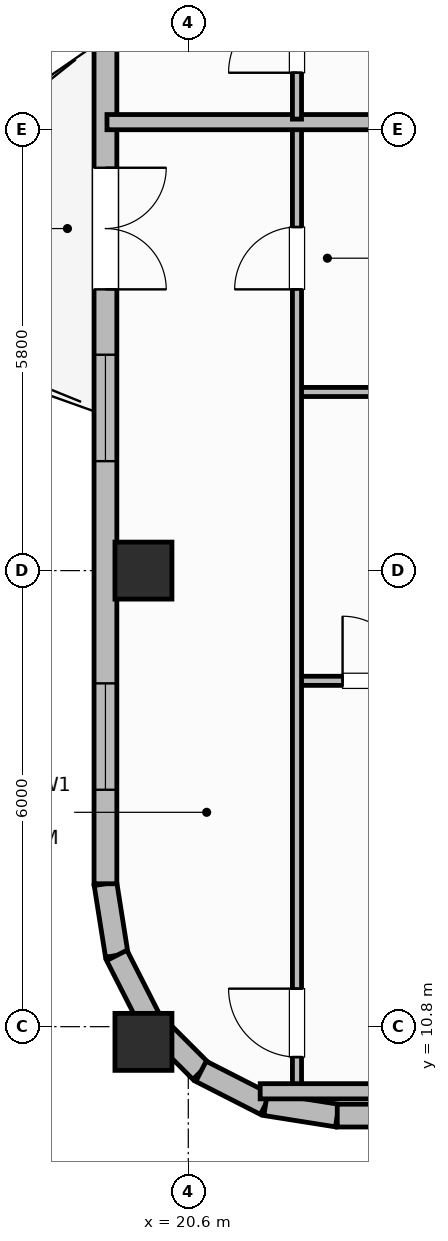
"""IFC4 building model, lengths in metres.
Left out: names, types, materials, properties, quantities, classifications, styles, units other than length and angle.
Written with IfcOpenShell. Run it as: python <this file> out.ifc"""

import sys

from ifc_helpers import new_model, si_unit, direction, frame, frame_2d, origin, origin_2d, place, context, subcontext, project, spatial, rectangle, extrude, element, fill, save


model = new_model("IFC4")
c1 = context("Model", 3, precision=1e-05, world=origin(), true_north=direction((0.0, 1.0)))
c2 = subcontext(c1, "Body", "Model", "MODEL_VIEW")
j1 = project(units=[si_unit("LENGTHUNIT", "METRE"), si_unit("PLANEANGLEUNIT", "RADIAN")], contexts=[c1])
p1 = place(None, origin())
s1 = spatial("IfcSite", under=j1, at=p1, CompositionType="ELEMENT")
p2 = place(p1, origin())
s2 = spatial("IfcBuilding", under=s1, at=p2, CompositionType="ELEMENT")
p3 = place(p2, frame((0.0, 0.0, 286.1)))
s3 = spatial("IfcBuildingStorey", under=s2, at=p3, CompositionType="ELEMENT", Elevation=286.1)
for number, where, z_axis, x_axis in (
    (1, (20.01, 10.6, 0.0), (0.0, 0.0, 1.0), (1.0, 0.0, 0.0)),
    (2, (20.01, 16.8, 0.0), (0.0, 0.0, 1.0), (1.0, 0.0, 0.0)),
):
    element("IfcColumn", number, at=place(p3, frame(where, z_axis=z_axis, x_axis=x_axis)), inside=s3, PredefinedType="COLUMN", context=c2, shape_type="SweptSolid", body=[
        extrude(rectangle(XDim=0.75, YDim=0.75, at=origin_2d()), origin(), (0.0, 0.0, 1.0), 3.7),
    ])
p4 = place(p3, frame((19.51, 12.68, 0.0), z_axis=(0.0, 0.0, 1.0), x_axis=(0.156343617883, -0.987702725088, 0.0)))
e3 = element("IfcWall", 3, at=p4, inside=s3, PredefinedType="SOLIDWALL", context=c2, shape_type="SweptSolid", body=[
    extrude(rectangle(XDim=0.954, YDim=0.3, at=frame_2d((0.477, 0.0))), origin(), (0.0, 0.0, 1.0), 2.73),
])
for number, where, z_axis, x_axis in (
    (4, (19.659, 11.738, 0.0), (0.0, 0.0, 1.0), (0.454, -0.891, 0.0)),
    (5, (20.093, 10.887, 0.0), (0.0, 0.0, 1.0), (0.707, -0.707, 0.0)),
):
    element("IfcWall", number, at=place(p3, frame(where, z_axis=z_axis, x_axis=x_axis)), inside=s3, PredefinedType="SOLIDWALL", context=c2, shape_type="SweptSolid", body=[
        extrude(rectangle(XDim=0.954, YDim=0.3, at=frame_2d((0.477, 0.0))), origin(), (0.0, 0.0, 1.0), 2.73),
    ])
p5 = place(p3, frame((20.767, 10.212, 0.0), z_axis=(0.0, 0.0, 1.0), x_axis=(0.891023873617, -0.45395644796, 0.0)))
e6 = element("IfcWall", 6, at=p5, inside=s3, PredefinedType="SOLIDWALL", context=c2, shape_type="SweptSolid", body=[
    extrude(rectangle(XDim=0.954, YDim=0.3, at=frame_2d((0.477, 0.0))), origin(), (0.0, 0.0, 1.0), 2.73),
])
p6 = place(p3, frame((21.617, 9.779, 0.0), z_axis=(0.0, 0.0, 1.0), x_axis=(0.987669453596, -0.156553666304, 0.0)))
e7 = element("IfcWall", 7, at=p6, inside=s3, PredefinedType="SOLIDWALL", context=c2, shape_type="SweptSolid", body=[
    extrude(rectangle(XDim=0.954, YDim=0.3, at=frame_2d((0.477, 0.0))), origin(), (0.0, 0.0, 1.0), 2.73),
])
p7 = place(p3, frame((22.56, 9.63, 0.0), z_axis=(0.0, 0.0, 1.0), x_axis=(1.0, 0.0, 0.0)))
e8 = element("IfcWall", 8, at=p7, inside=s3, PredefinedType="SOLIDWALL", context=c2, shape_type="SweptSolid", body=[
    extrude(rectangle(XDim=33.28, YDim=0.3, at=frame_2d((16.64, 0.0))), origin(), (0.0, 0.0, 1.0), 2.73),
])
p8 = place(p7, frame((4.747, 0.0, 0.76)))
e9 = element("IfcOpeningElement", 9, at=p8, cuts=e8, PredefinedType="OPENING", context=c2, shape_type="SweptSolid", body=[
    extrude(rectangle(XDim=1.4, YDim=1.85, at=frame_2d((0.7, 0.925))), frame((0.0, 0.16, 0.0), z_axis=(0.0, -1.0, 0.0), x_axis=(1.0, 0.0, 0.0)), (0.0, 0.0, 1.0), 0.32),
])
p9 = place(p7, frame((7.945, 0.0, 0.76)))
e10 = element("IfcOpeningElement", 10, at=p9, cuts=e8, PredefinedType="OPENING", context=c2, shape_type="SweptSolid", body=[
    extrude(rectangle(XDim=1.4, YDim=1.85, at=frame_2d((0.7, 0.925))), frame((0.0, 0.16, 0.0), z_axis=(0.0, -1.0, 0.0), x_axis=(1.0, 0.0, 0.0)), (0.0, 0.0, 1.0), 0.32),
])
p10 = place(p7, frame((14.341, 0.0, 0.76)))
e11 = element("IfcOpeningElement", 11, at=p10, cuts=e8, PredefinedType="OPENING", context=c2, shape_type="SweptSolid", body=[
    extrude(rectangle(XDim=1.4, YDim=1.85, at=frame_2d((0.7, 0.925))), frame((0.0, 0.16, 0.0), z_axis=(0.0, -1.0, 0.0), x_axis=(1.0, 0.0, 0.0)), (0.0, 0.0, 1.0), 0.32),
])
p11 = place(p7, frame((17.539, 0.0, 0.76)))
e12 = element("IfcOpeningElement", 12, at=p11, cuts=e8, PredefinedType="OPENING", context=c2, shape_type="SweptSolid", body=[
    extrude(rectangle(XDim=1.4, YDim=1.85, at=frame_2d((0.7, 0.925))), frame((0.0, 0.16, 0.0), z_axis=(0.0, -1.0, 0.0), x_axis=(1.0, 0.0, 0.0)), (0.0, 0.0, 1.0), 0.32),
])
p12 = place(p7, frame((23.935, 0.0, 0.76)))
e13 = element("IfcOpeningElement", 13, at=p12, cuts=e8, PredefinedType="OPENING", context=c2, shape_type="SweptSolid", body=[
    extrude(rectangle(XDim=1.4, YDim=1.85, at=frame_2d((0.7, 0.925))), frame((0.0, 0.16, 0.0), z_axis=(0.0, -1.0, 0.0), x_axis=(1.0, 0.0, 0.0)), (0.0, 0.0, 1.0), 0.32),
])
p13 = place(p7, frame((27.133, 0.0, 0.76)))
e14 = element("IfcOpeningElement", 14, at=p13, cuts=e8, PredefinedType="OPENING", context=c2, shape_type="SweptSolid", body=[
    extrude(rectangle(XDim=1.4, YDim=1.85, at=frame_2d((0.7, 0.925))), frame((0.0, 0.16, 0.0), z_axis=(0.0, -1.0, 0.0), x_axis=(1.0, 0.0, 0.0)), (0.0, 0.0, 1.0), 0.32),
])
p14 = place(p3, frame((19.51, 23.8, 0.0), z_axis=(0.0, 0.0, 1.0), x_axis=(0.0, -1.0, 0.0)))
e15 = element("IfcWall", 15, at=p14, inside=s3, PredefinedType="SOLIDWALL", context=c2, shape_type="SweptSolid", body=[
    extrude(rectangle(XDim=11.12, YDim=0.3, at=frame_2d((5.56, 0.0))), origin(), (0.0, 0.0, 1.0), 2.73),
])
p15 = place(p14, frame((1.7, 0.0, 0.0)))
e16 = element("IfcOpeningElement", 16, at=p15, cuts=e15, PredefinedType="OPENING", context=c2, shape_type="SweptSolid", body=[
    extrude(rectangle(XDim=1.6, YDim=2.1, at=frame_2d((0.8, 1.05))), frame((0.0, 0.16, 0.0), z_axis=(0.0, -1.0, 0.0), x_axis=(1.0, 0.0, 0.0)), (0.0, 0.0, 1.0), 0.32),
])
p16 = place(p14, frame((4.16, 0.0, 0.76)))
e17 = element("IfcOpeningElement", 17, at=p16, cuts=e15, PredefinedType="OPENING", context=c2, shape_type="SweptSolid", body=[
    extrude(rectangle(XDim=1.4, YDim=1.85, at=frame_2d((0.7, 0.925))), frame((0.0, 0.16, 0.0), z_axis=(0.0, -1.0, 0.0), x_axis=(1.0, 0.0, 0.0)), (0.0, 0.0, 1.0), 0.32),
])
p17 = place(p14, frame((8.483, 0.0, 0.76)))
e18 = element("IfcOpeningElement", 18, at=p17, cuts=e15, PredefinedType="OPENING", context=c2, shape_type="SweptSolid", body=[
    extrude(rectangle(XDim=1.4, YDim=1.85, at=frame_2d((0.7, 0.925))), frame((0.0, 0.16, 0.0), z_axis=(0.0, -1.0, 0.0), x_axis=(1.0, 0.0, 0.0)), (0.0, 0.0, 1.0), 0.32),
])
p18 = place(p3, frame((22.03, 15.35, 0.0), z_axis=(0.0, 0.0, 1.0), x_axis=(1.0, 0.0, 0.0)))
e19 = element("IfcWall", 19, at=p18, inside=s3, PredefinedType="PARTITIONING", context=c2, shape_type="SweptSolid", body=[
    extrude(rectangle(XDim=1.95, YDim=0.12, at=frame_2d((0.975, 0.0))), origin(), (0.0, 0.0, 1.0), 2.56),
])
p19 = place(p18, frame((0.6, 0.0, 0.0)))
e20 = element("IfcOpeningElement", 20, at=p19, cuts=e19, PredefinedType="OPENING", context=c2, shape_type="SweptSolid", body=[
    extrude(rectangle(XDim=0.85, YDim=2.1, at=frame_2d((0.425, 1.05))), frame((0.0, 0.07, 0.0), z_axis=(0.0, -1.0, 0.0), x_axis=(1.0, 0.0, 0.0)), (0.0, 0.0, 1.0), 0.14),
])
p20 = place(p3, frame((22.03, 19.15, 0.0), z_axis=(0.0, 0.0, 1.0), x_axis=(1.0, 0.0, 0.0)))
e21 = element("IfcWall", 21, at=p20, inside=s3, PredefinedType="PARTITIONING", context=c2, shape_type="SweptSolid", body=[
    extrude(rectangle(XDim=1.95, YDim=0.12, at=frame_2d((0.975, 0.0))), origin(), (0.0, 0.0, 1.0), 2.56),
])
p21 = place(p3, frame((22.03, 9.99, 0.0), z_axis=(0.0, 0.0, 1.0), x_axis=(0.0, 1.0, 0.0)))
e22 = element("IfcWall", 22, at=p21, inside=s3, PredefinedType="PARTITIONING", context=c2, shape_type="SweptSolid", body=[
    extrude(rectangle(XDim=12.67, YDim=0.12, at=frame_2d((6.335, 0.0))), origin(), (0.0, 0.0, 1.0), 2.56),
])
p22 = place(p21, frame((0.41, 0.0, 0.0)))
e23 = element("IfcOpeningElement", 23, at=p22, cuts=e22, PredefinedType="OPENING", context=c2, shape_type="SweptSolid", body=[
    extrude(rectangle(XDim=0.9, YDim=2.1, at=frame_2d((0.45, 1.05))), frame((0.0, 0.07, 0.0), z_axis=(0.0, -1.0, 0.0), x_axis=(1.0, 0.0, 0.0)), (0.0, 0.0, 1.0), 0.14),
])
p23 = place(p21, frame((10.51, 0.0, 0.0)))
e24 = element("IfcOpeningElement", 24, at=p23, cuts=e22, PredefinedType="OPENING", context=c2, shape_type="SweptSolid", body=[
    extrude(rectangle(XDim=0.82, YDim=2.08, at=frame_2d((0.41, 1.04))), frame((0.0, 0.07, 0.0), z_axis=(0.0, -1.0, 0.0), x_axis=(1.0, 0.0, 0.0)), (0.0, 0.0, 1.0), 0.14),
])
p24 = place(p3, frame((19.53, 22.7, 0.0), z_axis=(0.0, 0.0, 1.0), x_axis=(1.0, 0.0, 0.0)))
e25 = element("IfcWall", 25, at=p24, inside=s3, PredefinedType="PARTITIONING", context=c2, shape_type="SweptSolid", body=[
    extrude(rectangle(XDim=4.45, YDim=0.2, at=frame_2d((2.225, 0.0))), origin(), (0.0, 0.0, 1.0), 2.56),
])
p25 = place(p3, frame((22.03, 22.74, 0.0), z_axis=(0.0, 0.0, 1.0), x_axis=(0.0, 1.0, 0.0)))
e26 = element("IfcWall", 26, at=p25, inside=s3, PredefinedType="PARTITIONING", context=c2, shape_type="SweptSolid", body=[
    extrude(rectangle(XDim=11.625, YDim=0.12, at=frame_2d((5.812, 0.0))), origin(), (0.0, 0.0, 1.0), 2.56),
])
p26 = place(p25, frame((0.61, 0.0, 0.0)))
e27 = element("IfcOpeningElement", 27, at=p26, cuts=e26, PredefinedType="OPENING", context=c2, shape_type="SweptSolid", body=[
    extrude(rectangle(XDim=0.9, YDim=2.1, at=frame_2d((0.45, 1.05))), frame((0.0, 0.07, 0.0), z_axis=(0.0, -1.0, 0.0), x_axis=(1.0, 0.0, 0.0)), (0.0, 0.0, 1.0), 0.14),
])
p27 = place(p3, frame((21.546, 9.95, 0.0), z_axis=(0.0, 0.0, 1.0), x_axis=(1.0, 0.0, 0.0)))
e28 = element("IfcWall", 28, at=p27, inside=s3, PredefinedType="PARTITIONING", context=c2, shape_type="SweptSolid", body=[
    extrude(rectangle(XDim=3.754, YDim=0.2, at=frame_2d((1.877, 0.0))), origin(), (0.0, 0.0, 1.0), 2.56),
])
p28 = place(p15, origin())
e29 = element("IfcDoor", 29, at=p28, inside=s3, OperationType="DOUBLE_DOOR_SINGLE_SWING", PredefinedType="DOOR", context=c2, shape_type="SweptSolid", body=[
    extrude(rectangle(XDim=1.6, YDim=2.1, at=frame_2d((0.8, 1.05))), frame((0.0, 0.025, 0.0), z_axis=(0.0, -1.0, 0.0), x_axis=(1.0, 0.0, 0.0)), (0.0, 0.0, 1.0), 0.05),
])
fill(e16, e29)
p29 = place(p16, origin())
e30 = element("IfcWindow", 30, at=p29, inside=s3, PartitioningType="SINGLE_PANEL", PredefinedType="WINDOW", context=c2, shape_type="SweptSolid", body=[
    extrude(rectangle(XDim=1.4, YDim=1.85, at=frame_2d((0.7, 0.925))), frame((0.0, 0.03, 0.0), z_axis=(0.0, -1.0, 0.0), x_axis=(1.0, 0.0, 0.0)), (0.0, 0.0, 1.0), 0.06),
])
fill(e17, e30)
p30 = place(p17, origin())
e31 = element("IfcWindow", 31, at=p30, inside=s3, PartitioningType="SINGLE_PANEL", PredefinedType="WINDOW", context=c2, shape_type="SweptSolid", body=[
    extrude(rectangle(XDim=1.4, YDim=1.85, at=frame_2d((0.7, 0.925))), frame((0.0, 0.03, 0.0), z_axis=(0.0, -1.0, 0.0), x_axis=(1.0, 0.0, 0.0)), (0.0, 0.0, 1.0), 0.06),
])
fill(e18, e31)
p31 = place(p19, origin())
e32 = element("IfcDoor", 32, at=p31, inside=s3, OperationType="SINGLE_SWING_LEFT", PredefinedType="DOOR", context=c2, shape_type="SweptSolid", body=[
    extrude(rectangle(XDim=0.85, YDim=2.1, at=frame_2d((0.425, 1.05))), frame((0.0, 0.025, 0.0), z_axis=(0.0, -1.0, 0.0), x_axis=(1.0, 0.0, 0.0)), (0.0, 0.0, 1.0), 0.05),
])
fill(e20, e32)
p32 = place(p22, origin())
e33 = element("IfcDoor", 33, at=p32, inside=s3, OperationType="SINGLE_SWING_RIGHT", PredefinedType="DOOR", context=c2, shape_type="SweptSolid", body=[
    extrude(rectangle(XDim=0.9, YDim=2.1, at=frame_2d((0.45, 1.05))), frame((0.0, 0.025, 0.0), z_axis=(0.0, -1.0, 0.0), x_axis=(1.0, 0.0, 0.0)), (0.0, 0.0, 1.0), 0.05),
])
fill(e23, e33)
p33 = place(p23, origin())
e34 = element("IfcDoor", 34, at=p33, inside=s3, OperationType="SINGLE_SWING_LEFT", PredefinedType="DOOR", context=c2, shape_type="SweptSolid", body=[
    extrude(rectangle(XDim=0.82, YDim=2.08, at=frame_2d((0.41, 1.04))), frame((0.0, 0.025, 0.0), z_axis=(0.0, -1.0, 0.0), x_axis=(1.0, 0.0, 0.0)), (0.0, 0.0, 1.0), 0.05),
])
fill(e24, e34)
p34 = place(p26, origin())
e35 = element("IfcDoor", 35, at=p34, inside=s3, OperationType="SINGLE_SWING_LEFT", PredefinedType="DOOR", context=c2, shape_type="SweptSolid", body=[
    extrude(rectangle(XDim=0.9, YDim=2.1, at=frame_2d((0.45, 1.05))), frame((0.0, 0.025, 0.0), z_axis=(0.0, -1.0, 0.0), x_axis=(1.0, 0.0, 0.0)), (0.0, 0.0, 1.0), 0.05),
])
fill(e27, e35)
save(model, sys.argv[1])
